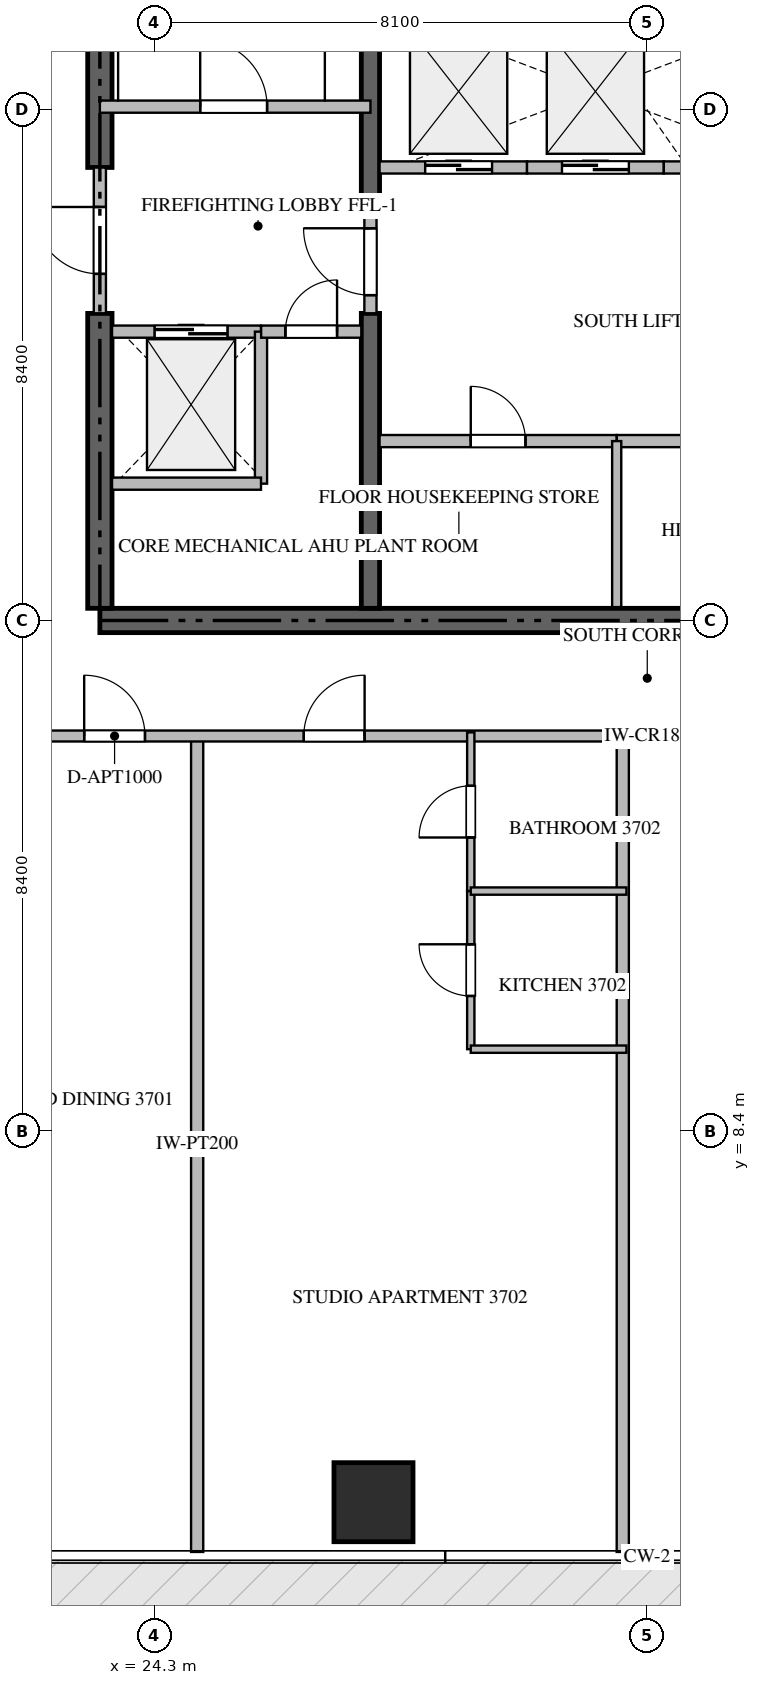
"""IFC4 building model, lengths in metres.
Left out: names, types, materials, properties, quantities, classifications, styles, units other than length and angle.
Written with IfcOpenShell. Run it as: python <this file> out.ifc"""

import sys

from ifc_helpers import new_model, si_unit, direction, frame, frame_2d, origin, origin_2d, place, context, subcontext, project, spatial, rectangle, extrude, source, transform, mapped, element, fill, save


model = new_model("IFC4")
c1 = context("Model", 3, precision=1e-05, world=origin(), true_north=direction((0.0, 1.0)))
c2 = subcontext(c1, "Body", "Model", "MODEL_VIEW")
j1 = project(units=[si_unit("LENGTHUNIT", "METRE"), si_unit("PLANEANGLEUNIT", "RADIAN")], contexts=[c1])
p1 = place(None, origin())
s1 = spatial("IfcSite", under=j1, at=p1, CompositionType="ELEMENT")
p2 = place(p1, origin())
s2 = spatial("IfcBuilding", under=s1, at=p2, CompositionType="ELEMENT")
p3 = place(p2, frame((0.0, 0.0, 150.15)))
s3 = spatial("IfcBuildingStorey", under=s2, at=p3, CompositionType="ELEMENT", Elevation=150.15)
p4 = place(p3, frame((23.4, 16.8, -0.26), z_axis=(0.0, 0.0, 1.0), x_axis=(1.0, 0.0, 0.0)))
e1 = element("IfcWall", 1, at=p4, inside=s3, PredefinedType="SHEAR", context=c2, shape_type="SweptSolid", body=[
    extrude(rectangle(XDim=18.0, YDim=0.4, at=frame_2d((9.0, 0.0))), origin(), (0.0, 0.0, 1.0), 3.748),
])
p5 = place(p3, frame((23.4, 17.0, -0.26), z_axis=(0.0, 0.0, 1.0), x_axis=(0.0, 1.0, 0.0)))
e2 = element("IfcWall", 2, at=p5, inside=s3, PredefinedType="SHEAR", context=c2, shape_type="SweptSolid", body=[
    extrude(rectangle(XDim=4.85, YDim=0.4, at=frame_2d((2.425, 0.0))), origin(), (0.0, 0.0, 1.0), 3.748),
])
p6 = place(p3, frame((23.4, 24.25, -0.26), z_axis=(0.0, 0.0, 1.0), x_axis=(0.0, 1.0, 0.0)))
e3 = element("IfcWall", 3, at=p6, inside=s3, PredefinedType="SHEAR", context=c2, shape_type="SweptSolid", body=[
    extrude(rectangle(XDim=9.15, YDim=0.4, at=frame_2d((4.575, 0.0))), origin(), (0.0, 0.0, 1.0), 3.748),
])
p7 = place(p3, frame((27.85, 17.0, -0.26), z_axis=(0.0, 0.0, 1.0), x_axis=(0.0, 1.0, 0.0)))
e4 = element("IfcWall", 4, at=p7, inside=s3, PredefinedType="SHEAR", context=c2, shape_type="SweptSolid", body=[
    extrude(rectangle(XDim=4.85, YDim=0.3, at=frame_2d((2.425, 0.0))), origin(), (0.0, 0.0, 1.0), 3.748),
])
p8 = place(p3, frame((27.85, 23.55, -0.26), z_axis=(0.0, 0.0, 1.0), x_axis=(0.0, 1.0, 0.0)))
e5 = element("IfcWall", 5, at=p8, inside=s3, PredefinedType="SHEAR", context=c2, shape_type="SweptSolid", body=[
    extrude(rectangle(XDim=9.85, YDim=0.3, at=frame_2d((4.925, 0.0))), origin(), (0.0, 0.0, 1.0), 3.748),
])
m1 = source(origin(), c2, "Body", "SweptSolid", [
    extrude(rectangle(XDim=1.3, YDim=1.3, at=origin_2d()), origin(), (0.0, 0.0, 1.0), 3.75),
])
p9 = place(p3, frame((27.9, 2.3, -0.26), z_axis=(0.0, 0.0, 1.0), x_axis=(1.0, 0.0, 0.0)))
e6 = element("IfcColumn", 6, at=p9, inside=s3, PredefinedType="COLUMN", context=c2, shape_type="MappedRepresentation", body=[
    mapped(m1, transform((0.0, 0.0, 0.0), scale=1.0)),
])
p10 = place(p3, frame((23.4, 25.25, 0.0), z_axis=(0.0, 0.0, 1.0), x_axis=(1.0, 0.0, 0.0)))
e7 = element("IfcWall", 7, at=p10, inside=s3, PredefinedType="STANDARD", context=c2, shape_type="SweptSolid", body=[
    extrude(rectangle(XDim=4.45, YDim=0.2, at=frame_2d((2.225, 0.0))), origin(), (0.0, 0.0, 1.0), 3.49),
])
p11 = place(p10, frame((1.65, 0.0, 0.0)))
e8 = element("IfcOpeningElement", 8, at=p11, cuts=e7, PredefinedType="OPENING", context=c2, shape_type="SweptSolid", body=[
    extrude(rectangle(XDim=1.1, YDim=2.15, at=frame_2d((0.55, 1.075))), frame((0.0, 0.11, 0.0), z_axis=(0.0, -1.0, 0.0), x_axis=(1.0, 0.0, 0.0)), (0.0, 0.0, 1.0), 0.22),
])
p12 = place(p3, frame((23.6, 21.55, 0.0), z_axis=(0.0, 0.0, 1.0), x_axis=(1.0, 0.0, 0.0)))
e9 = element("IfcWall", 9, at=p12, inside=s3, PredefinedType="STANDARD", context=c2, shape_type="SweptSolid", body=[
    extrude(rectangle(XDim=2.45, YDim=0.2, at=frame_2d((1.225, 0.0))), origin(), (0.0, 0.0, 1.0), 3.49),
])
p13 = place(p12, frame((0.7, 0.0, 0.0)))
e10 = element("IfcOpeningElement", 10, at=p13, cuts=e9, PredefinedType="OPENING", context=c2, shape_type="SweptSolid", body=[
    extrude(rectangle(XDim=1.2, YDim=2.2, at=frame_2d((0.6, 1.1))), frame((0.0, 0.11, 0.0), z_axis=(0.0, -1.0, 0.0), x_axis=(1.0, 0.0, 0.0)), (0.0, 0.0, 1.0), 0.22),
])
p14 = place(p3, frame((28.0, 24.25, 0.0), z_axis=(0.0, 0.0, 1.0), x_axis=(1.0, 0.0, 0.0)))
e11 = element("IfcWall", 11, at=p14, inside=s3, PredefinedType="STANDARD", context=c2, shape_type="SweptSolid", body=[
    extrude(rectangle(XDim=2.425, YDim=0.2, at=frame_2d((1.212, 0.0))), origin(), (0.0, 0.0, 1.0), 3.49),
])
p15 = place(p14, frame((0.75, 0.0, 0.0)))
e12 = element("IfcOpeningElement", 12, at=p15, cuts=e11, PredefinedType="OPENING", context=c2, shape_type="SweptSolid", body=[
    extrude(rectangle(XDim=1.1, YDim=2.2, at=frame_2d((0.55, 1.1))), frame((0.0, 0.11, 0.0), z_axis=(0.0, -1.0, 0.0), x_axis=(1.0, 0.0, 0.0)), (0.0, 0.0, 1.0), 0.22),
])
p16 = place(p3, frame((30.425, 24.25, 0.0), z_axis=(0.0, 0.0, 1.0), x_axis=(1.0, 0.0, 0.0)))
e13 = element("IfcWall", 13, at=p16, inside=s3, PredefinedType="STANDARD", context=c2, shape_type="SweptSolid", body=[
    extrude(rectangle(XDim=2.25, YDim=0.2, at=frame_2d((1.125, 0.0))), origin(), (0.0, 0.0, 1.0), 3.49),
])
p17 = place(p16, frame((0.575, 0.0, 0.0)))
e14 = element("IfcOpeningElement", 14, at=p17, cuts=e13, PredefinedType="OPENING", context=c2, shape_type="SweptSolid", body=[
    extrude(rectangle(XDim=1.1, YDim=2.2, at=frame_2d((0.55, 1.1))), frame((0.0, 0.11, 0.0), z_axis=(0.0, -1.0, 0.0), x_axis=(1.0, 0.0, 0.0)), (0.0, 0.0, 1.0), 0.22),
])
p18 = place(p3, frame((32.675, 24.25, 0.0), z_axis=(0.0, 0.0, 1.0), x_axis=(1.0, 0.0, 0.0)))
e15 = element("IfcWall", 15, at=p18, inside=s3, PredefinedType="STANDARD", context=c2, shape_type="SweptSolid", body=[
    extrude(rectangle(XDim=2.275, YDim=0.2, at=frame_2d((1.137, 0.0))), origin(), (0.0, 0.0, 1.0), 3.49),
])
p19 = place(p18, frame((0.575, 0.0, 0.0)))
e16 = element("IfcOpeningElement", 16, at=p19, cuts=e15, PredefinedType="OPENING", context=c2, shape_type="SweptSolid", body=[
    extrude(rectangle(XDim=1.1, YDim=2.2, at=frame_2d((0.55, 1.1))), frame((0.0, 0.11, 0.0), z_axis=(0.0, -1.0, 0.0), x_axis=(1.0, 0.0, 0.0)), (0.0, 0.0, 1.0), 0.22),
])
p20 = place(p3, frame((26.05, 19.05, 0.0), z_axis=(0.0, 0.0, 1.0), x_axis=(0.0, 1.0, 0.0)))
e17 = element("IfcWall", 17, at=p20, inside=s3, PredefinedType="STANDARD", context=c2, shape_type="SweptSolid", body=[
    extrude(rectangle(XDim=2.5, YDim=0.2, at=frame_2d((1.25, 0.0))), origin(), (0.0, 0.0, 1.0), 3.49),
])
p21 = place(p3, frame((23.6, 19.05, 0.0), z_axis=(0.0, 0.0, 1.0), x_axis=(1.0, 0.0, 0.0)))
e18 = element("IfcWall", 18, at=p21, inside=s3, PredefinedType="STANDARD", context=c2, shape_type="SweptSolid", body=[
    extrude(rectangle(XDim=2.45, YDim=0.2, at=frame_2d((1.225, 0.0))), origin(), (0.0, 0.0, 1.0), 3.49),
])
p22 = place(p3, frame((26.052, 21.55, 0.0), z_axis=(0.0, 0.0, 1.0), x_axis=(1.0, 0.0, 0.0)))
e19 = element("IfcWall", 19, at=p22, inside=s3, PredefinedType="STANDARD", context=c2, shape_type="SweptSolid", body=[
    extrude(rectangle(XDim=1.648, YDim=0.2, at=frame_2d((0.824, 0.0))), origin(), (0.0, 0.0, 1.0), 3.49),
])
p23 = place(p22, frame((0.399, 0.0, 0.0)))
e20 = element("IfcOpeningElement", 20, at=p23, cuts=e19, PredefinedType="OPENING", context=c2, shape_type="SweptSolid", body=[
    extrude(rectangle(XDim=0.85, YDim=2.1, at=frame_2d((0.425, 1.05))), frame((0.0, 0.11, 0.0), z_axis=(0.0, -1.0, 0.0), x_axis=(1.0, 0.0, 0.0)), (0.0, 0.0, 1.0), 0.22),
])
p24 = place(p3, frame((23.4, 21.852, 0.0), z_axis=(0.0, 0.0, 1.0), x_axis=(0.0, 1.0, 0.0)))
e21 = element("IfcWall", 21, at=p24, inside=s3, PredefinedType="STANDARD", context=c2, shape_type="SweptSolid", body=[
    extrude(rectangle(XDim=2.396, YDim=0.2, at=frame_2d((1.198, 0.0))), origin(), (0.0, 0.0, 1.0), 3.49),
])
p25 = place(p24, frame((0.648, 0.0, 0.0)))
e22 = element("IfcOpeningElement", 22, at=p25, cuts=e21, PredefinedType="OPENING", context=c2, shape_type="SweptSolid", body=[
    extrude(rectangle(XDim=1.1, YDim=2.15, at=frame_2d((0.55, 1.075))), frame((0.0, 0.11, 0.0), z_axis=(0.0, -1.0, 0.0), x_axis=(1.0, 0.0, 0.0)), (0.0, 0.0, 1.0), 0.22),
])
p26 = place(p3, frame((27.85, 21.852, 0.0), z_axis=(0.0, 0.0, 1.0), x_axis=(0.0, 1.0, 0.0)))
e23 = element("IfcWall", 23, at=p26, inside=s3, PredefinedType="STANDARD", context=c2, shape_type="SweptSolid", body=[
    extrude(rectangle(XDim=1.696, YDim=0.2, at=frame_2d((0.848, 0.0))), origin(), (0.0, 0.0, 1.0), 3.49),
])
p27 = place(p26, frame((0.298, 0.0, 0.0)))
e24 = element("IfcOpeningElement", 24, at=p27, cuts=e23, PredefinedType="OPENING", context=c2, shape_type="SweptSolid", body=[
    extrude(rectangle(XDim=1.1, YDim=2.15, at=frame_2d((0.55, 1.075))), frame((0.0, 0.11, 0.0), z_axis=(0.0, -1.0, 0.0), x_axis=(1.0, 0.0, 0.0)), (0.0, 0.0, 1.0), 0.22),
])
p28 = place(p3, frame((28.0, 19.75, 0.0), z_axis=(0.0, 0.0, 1.0), x_axis=(1.0, 0.0, 0.0)))
e25 = element("IfcWall", 25, at=p28, inside=s3, PredefinedType="STANDARD", context=c2, shape_type="SweptSolid", body=[
    extrude(rectangle(XDim=3.9, YDim=0.2, at=frame_2d((1.95, 0.0))), origin(), (0.0, 0.0, 1.0), 3.49),
])
p29 = place(p28, frame((1.5, 0.0, 0.0)))
e26 = element("IfcOpeningElement", 26, at=p29, cuts=e25, PredefinedType="OPENING", context=c2, shape_type="SweptSolid", body=[
    extrude(rectangle(XDim=0.9, YDim=2.1, at=frame_2d((0.45, 1.05))), frame((0.0, 0.11, 0.0), z_axis=(0.0, -1.0, 0.0), x_axis=(1.0, 0.0, 0.0)), (0.0, 0.0, 1.0), 0.22),
])
p30 = place(p3, frame((31.902, 19.75, 0.0), z_axis=(0.0, 0.0, 1.0), x_axis=(1.0, 0.0, 0.0)))
e27 = element("IfcWall", 27, at=p30, inside=s3, PredefinedType="STANDARD", context=c2, shape_type="SweptSolid", body=[
    extrude(rectangle(XDim=4.898, YDim=0.2, at=frame_2d((2.449, 0.0))), origin(), (0.0, 0.0, 1.0), 3.49),
])
p31 = place(p30, frame((1.999, 0.0, 0.0)))
e28 = element("IfcOpeningElement", 28, at=p31, cuts=e27, PredefinedType="OPENING", context=c2, shape_type="SweptSolid", body=[
    extrude(rectangle(XDim=0.9, YDim=2.1, at=frame_2d((0.45, 1.05))), frame((0.0, 0.11, 0.0), z_axis=(0.0, -1.0, 0.0), x_axis=(1.0, 0.0, 0.0)), (0.0, 0.0, 1.0), 0.22),
])
p32 = place(p3, frame((31.9, 17.02, 0.0), z_axis=(0.0, 0.0, 1.0), x_axis=(0.0, 1.0, 0.0)))
e29 = element("IfcWall", 29, at=p32, inside=s3, PredefinedType="PARTITIONING", context=c2, shape_type="SweptSolid", body=[
    extrude(rectangle(XDim=2.73, YDim=0.15, at=frame_2d((1.365, 0.0))), origin(), (0.0, 0.0, 1.0), 3.49),
])
for number, where, z_axis, x_axis in (
    (30, (25.0, 1.482, 0.0), (0.0, 0.0, 1.0), (0.0, 1.0, 0.0)),
    (31, (32.0, 1.482, 0.0), (0.0, 0.0, 1.0), (0.0, 1.0, 0.0)),
):
    element("IfcWall", number, at=place(p3, frame(where, z_axis=z_axis, x_axis=x_axis)), inside=s3, PredefinedType="PARTITIONING", context=c2, shape_type="SweptSolid", body=[
        extrude(rectangle(XDim=13.418, YDim=0.2, at=frame_2d((6.709, 0.0))), origin(), (0.0, 0.0, 1.0), 3.49),
    ])
p33 = place(p3, frame((20.952, 14.9, 0.0), z_axis=(0.0, 0.0, 1.0), x_axis=(1.0, 0.0, 0.0)))
e32 = element("IfcWall", 32, at=p33, inside=s3, PredefinedType="PARTITIONING", context=c2, shape_type="SweptSolid", body=[
    extrude(rectangle(XDim=22.896, YDim=0.18, at=frame_2d((11.448, 0.0))), origin(), (0.0, 0.0, 1.0), 3.49),
])
p34 = place(p33, frame((2.19, 0.0, 0.0)))
e33 = element("IfcOpeningElement", 33, at=p34, cuts=e32, PredefinedType="OPENING", context=c2, shape_type="SweptSolid", body=[
    extrude(rectangle(XDim=1.0, YDim=2.15, at=frame_2d((0.5, 1.075))), frame((0.0, 0.1, 0.0), z_axis=(0.0, -1.0, 0.0), x_axis=(1.0, 0.0, 0.0)), (0.0, 0.0, 1.0), 0.2),
])
p35 = place(p33, frame((5.802, 0.0, 0.0)))
e34 = element("IfcOpeningElement", 34, at=p35, cuts=e32, PredefinedType="OPENING", context=c2, shape_type="SweptSolid", body=[
    extrude(rectangle(XDim=1.0, YDim=2.15, at=frame_2d((0.5, 1.075))), frame((0.0, 0.1, 0.0), z_axis=(0.0, -1.0, 0.0), x_axis=(1.0, 0.0, 0.0)), (0.0, 0.0, 1.0), 0.2),
])
p36 = place(p33, frame((12.196, 0.0, 0.0)))
e35 = element("IfcOpeningElement", 35, at=p36, cuts=e32, PredefinedType="OPENING", context=c2, shape_type="SweptSolid", body=[
    extrude(rectangle(XDim=1.0, YDim=2.15, at=frame_2d((0.5, 1.075))), frame((0.0, 0.1, 0.0), z_axis=(0.0, -1.0, 0.0), x_axis=(1.0, 0.0, 0.0)), (0.0, 0.0, 1.0), 0.2),
])
p37 = place(p33, frame((19.706, 0.0, 0.0)))
e36 = element("IfcOpeningElement", 36, at=p37, cuts=e32, PredefinedType="OPENING", context=c2, shape_type="SweptSolid", body=[
    extrude(rectangle(XDim=1.0, YDim=2.15, at=frame_2d((0.5, 1.075))), frame((0.0, 0.1, 0.0), z_axis=(0.0, -1.0, 0.0), x_axis=(1.0, 0.0, 0.0)), (0.0, 0.0, 1.0), 0.2),
])
p38 = place(p3, frame((29.5, 9.75, 0.0), z_axis=(0.0, 0.0, 1.0), x_axis=(0.0, 1.0, 0.0)))
e37 = element("IfcWall", 37, at=p38, inside=s3, PredefinedType="PARTITIONING", context=c2, shape_type="SweptSolid", body=[
    extrude(rectangle(XDim=2.6, YDim=0.12, at=frame_2d((1.3, 0.0))), origin(), (0.0, 0.0, 1.0), 3.49),
])
p39 = place(p38, frame((0.875, 0.0, 0.0)))
e38 = element("IfcOpeningElement", 38, at=p39, cuts=e37, PredefinedType="OPENING", context=c2, shape_type="SweptSolid", body=[
    extrude(rectangle(XDim=0.85, YDim=2.1, at=frame_2d((0.425, 1.05))), frame((0.0, 0.07, 0.0), z_axis=(0.0, -1.0, 0.0), x_axis=(1.0, 0.0, 0.0)), (0.0, 0.0, 1.0), 0.14),
])
p40 = place(p3, frame((29.5, 12.352, 0.0), z_axis=(0.0, 0.0, 1.0), x_axis=(0.0, 1.0, 0.0)))
e39 = element("IfcWall", 39, at=p40, inside=s3, PredefinedType="PARTITIONING", context=c2, shape_type="SweptSolid", body=[
    extrude(rectangle(XDim=2.608, YDim=0.12, at=frame_2d((1.304, 0.0))), origin(), (0.0, 0.0, 1.0), 3.49),
])
p41 = place(p40, frame((0.879, 0.0, 0.0)))
e40 = element("IfcOpeningElement", 40, at=p41, cuts=e39, PredefinedType="OPENING", context=c2, shape_type="SweptSolid", body=[
    extrude(rectangle(XDim=0.85, YDim=2.1, at=frame_2d((0.425, 1.05))), frame((0.0, 0.07, 0.0), z_axis=(0.0, -1.0, 0.0), x_axis=(1.0, 0.0, 0.0)), (0.0, 0.0, 1.0), 0.14),
])
for number, where, z_axis, x_axis in (
    (41, (29.5, 12.35, 0.0), (0.0, 0.0, 1.0), (1.0, 0.0, 0.0)),
    (42, (29.5, 9.75, 0.0), (0.0, 0.0, 1.0), (1.0, 0.0, 0.0)),
):
    element("IfcWall", number, at=place(p3, frame(where, z_axis=z_axis, x_axis=x_axis)), inside=s3, PredefinedType="PARTITIONING", context=c2, shape_type="SweptSolid", body=[
        extrude(rectangle(XDim=2.56, YDim=0.12, at=frame_2d((1.28, 0.0))), origin(), (0.0, 0.0, 1.0), 3.49),
    ])
m2 = source(origin(), c2, "Body", "SweptSolid", [
    extrude(rectangle(XDim=1.1, YDim=2.15, at=frame_2d((0.55, 1.075))), frame((0.0, 0.025, 0.0), z_axis=(0.0, -1.0, 0.0), x_axis=(1.0, 0.0, 0.0)), (0.0, 0.0, 1.0), 0.05),
])
p42 = place(p11, origin())
e43 = element("IfcDoor", 43, at=p42, inside=s3, OperationType="SINGLE_SWING_LEFT", PredefinedType="DOOR", context=c2, shape_type="MappedRepresentation", body=[
    mapped(m2, transform((0.0, 0.0, 0.0), scale=1.0)),
])
fill(e8, e43)
m3 = source(origin(), c2, "Body", "SweptSolid", [
    extrude(rectangle(XDim=1.2, YDim=2.2, at=frame_2d((0.6, 1.1))), frame((0.0, 0.025, 0.0), z_axis=(0.0, -1.0, 0.0), x_axis=(1.0, 0.0, 0.0)), (0.0, 0.0, 1.0), 0.05),
])
p43 = place(p13, origin())
e44 = element("IfcDoor", 44, at=p43, inside=s3, OperationType="DOUBLE_DOOR_SLIDING", PredefinedType="DOOR", context=c2, shape_type="MappedRepresentation", body=[
    mapped(m3, transform((0.0, 0.0, 0.0), scale=1.0)),
])
fill(e10, e44)
m4 = source(origin(), c2, "Body", "SweptSolid", [
    extrude(rectangle(XDim=1.1, YDim=2.2, at=frame_2d((0.55, 1.1))), frame((0.0, 0.025, 0.0), z_axis=(0.0, -1.0, 0.0), x_axis=(1.0, 0.0, 0.0)), (0.0, 0.0, 1.0), 0.05),
])
p44 = place(p15, origin())
e45 = element("IfcDoor", 45, at=p44, inside=s3, OperationType="DOUBLE_DOOR_SLIDING", PredefinedType="DOOR", context=c2, shape_type="MappedRepresentation", body=[
    mapped(m4, transform((0.0, 0.0, 0.0), scale=1.0)),
])
fill(e12, e45)
p45 = place(p17, origin())
e46 = element("IfcDoor", 46, at=p45, inside=s3, OperationType="DOUBLE_DOOR_SLIDING", PredefinedType="DOOR", context=c2, shape_type="MappedRepresentation", body=[
    mapped(m4, transform((0.0, 0.0, 0.0), scale=1.0)),
])
fill(e14, e46)
m5 = source(origin(), c2, "Body", "SweptSolid", [
    extrude(rectangle(XDim=0.85, YDim=2.1, at=frame_2d((0.425, 1.05))), frame((0.0, 0.025, 0.0), z_axis=(0.0, -1.0, 0.0), x_axis=(1.0, 0.0, 0.0)), (0.0, 0.0, 1.0), 0.05),
])
p46 = place(p23, origin())
e47 = element("IfcDoor", 47, at=p46, inside=s3, OperationType="SINGLE_SWING_RIGHT", PredefinedType="DOOR", context=c2, shape_type="MappedRepresentation", body=[
    mapped(m5, transform((0.0, 0.0, 0.0), scale=1.0)),
])
fill(e20, e47)
p47 = place(p25, origin())
e48 = element("IfcDoor", 48, at=p47, inside=s3, OperationType="SINGLE_SWING_RIGHT", PredefinedType="DOOR", context=c2, shape_type="MappedRepresentation", body=[
    mapped(m2, transform((0.0, 0.0, 0.0), scale=1.0)),
])
fill(e22, e48)
p48 = place(p27, origin())
e49 = element("IfcDoor", 49, at=p48, inside=s3, OperationType="SINGLE_SWING_RIGHT", PredefinedType="DOOR", context=c2, shape_type="MappedRepresentation", body=[
    mapped(m2, transform((0.0, 0.0, 0.0), scale=1.0)),
])
fill(e24, e49)
m6 = source(origin(), c2, "Body", "SweptSolid", [
    extrude(rectangle(XDim=0.9, YDim=2.1, at=frame_2d((0.45, 1.05))), frame((0.0, 0.025, 0.0), z_axis=(0.0, -1.0, 0.0), x_axis=(1.0, 0.0, 0.0)), (0.0, 0.0, 1.0), 0.05),
])
p49 = place(p29, origin())
e50 = element("IfcDoor", 50, at=p49, inside=s3, OperationType="SINGLE_SWING_LEFT", PredefinedType="DOOR", context=c2, shape_type="MappedRepresentation", body=[
    mapped(m6, transform((0.0, 0.0, 0.0), scale=1.0)),
])
fill(e26, e50)
m7 = source(origin(), c2, "Body", "SweptSolid", [
    extrude(rectangle(XDim=1.0, YDim=2.15, at=frame_2d((0.5, 1.075))), frame((0.0, 0.025, 0.0), z_axis=(0.0, -1.0, 0.0), x_axis=(1.0, 0.0, 0.0)), (0.0, 0.0, 1.0), 0.05),
])
p50 = place(p34, origin())
e51 = element("IfcDoor", 51, at=p50, inside=s3, OperationType="SINGLE_SWING_LEFT", PredefinedType="DOOR", context=c2, shape_type="MappedRepresentation", body=[
    mapped(m7, transform((0.0, 0.0, 0.0), scale=1.0)),
])
fill(e33, e51)
p51 = place(p35, origin())
e52 = element("IfcDoor", 52, at=p51, inside=s3, OperationType="SINGLE_SWING_RIGHT", PredefinedType="DOOR", context=c2, shape_type="MappedRepresentation", body=[
    mapped(m7, transform((0.0, 0.0, 0.0), scale=1.0)),
])
fill(e34, e52)
p52 = place(p39, origin())
e53 = element("IfcDoor", 53, at=p52, inside=s3, OperationType="SINGLE_SWING_RIGHT", PredefinedType="DOOR", context=c2, shape_type="MappedRepresentation", body=[
    mapped(m5, transform((0.0, 0.0, 0.0), scale=1.0)),
])
fill(e38, e53)
p53 = place(p41, origin())
e54 = element("IfcDoor", 54, at=p53, inside=s3, OperationType="SINGLE_SWING_LEFT", PredefinedType="DOOR", context=c2, shape_type="MappedRepresentation", body=[
    mapped(m5, transform((0.0, 0.0, 0.0), scale=1.0)),
])
fill(e40, e54)
save(model, sys.argv[1])
